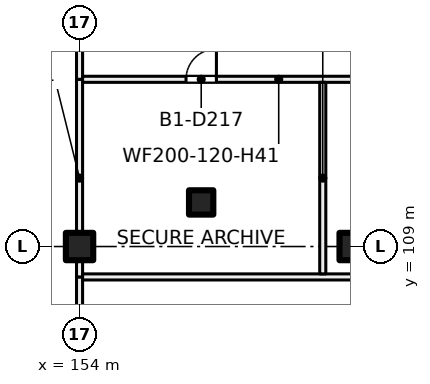
"""IFC4 building model, lengths in metres.
Left out: names, types, materials, properties, quantities, classifications, styles, units other than length and angle.
Written with IfcOpenShell. Run it as: python <this file> out.ifc"""

import sys

from ifc_helpers import new_model, si_unit, direction, frame, frame_2d, origin, origin_2d, place, context, subcontext, project, spatial, rectangle, extrude, element, fill, save


model = new_model("IFC4")
c1 = context("Model", 3, precision=1e-05, world=origin(), true_north=direction((0.0, 1.0)))
c2 = subcontext(c1, "Body", "Model", "MODEL_VIEW")
j1 = project(units=[si_unit("LENGTHUNIT", "METRE"), si_unit("PLANEANGLEUNIT", "RADIAN")], contexts=[c1])
p1 = place(None, origin())
s1 = spatial("IfcSite", under=j1, at=p1, CompositionType="ELEMENT")
p2 = place(p1, origin())
s2 = spatial("IfcBuilding", under=s1, at=p2, CompositionType="ELEMENT")
p3 = place(p2, frame((0.0, 0.0, -4.5)))
s3 = spatial("IfcBuildingStorey", under=s2, at=p3, CompositionType="ELEMENT", Elevation=-4.5)
for number, where, z_axis, x_axis in (
    (1, (154.0, 109.0, 0.0), (0.0, 0.0, 1.0), (1.0, 0.0, 0.0)),
    (2, (163.0, 109.0, 0.0), (0.0, 0.0, 1.0), (1.0, 0.0, 0.0)),
):
    element("IfcColumn", number, at=place(p3, frame(where, z_axis=z_axis, x_axis=x_axis)), inside=s3, PredefinedType="COLUMN", context=c2, shape_type="SweptSolid", body=[
        extrude(rectangle(XDim=0.9, YDim=0.9, at=origin_2d()), origin(), (0.0, 0.0, 1.0), 4.5),
    ])
p4 = place(p3, frame((158.0, 110.45, 0.0), z_axis=(0.0, 0.0, 1.0), x_axis=(1.0, 0.0, 0.0)))
e3 = element("IfcColumn", 3, at=p4, inside=s3, PredefinedType="COLUMN", context=c2, shape_type="SweptSolid", body=[
    extrude(rectangle(XDim=0.8, YDim=0.8, at=origin_2d()), origin(), (0.0, 0.0, 1.0), 4.5),
])
p5 = place(p3, frame((154.0, 104.1, 0.0), z_axis=(0.0, 0.0, 1.0), x_axis=(0.0, 1.0, 0.0)))
e4 = element("IfcWall", 4, at=p5, inside=s3, PredefinedType="PARTITIONING", context=c2, shape_type="SweptSolid", body=[
    extrude(rectangle(XDim=3.9, YDim=0.2, at=frame_2d((1.95, 0.0))), origin(), (0.0, 0.0, 1.0), 4.1),
])
p6 = place(p3, frame((154.0, 108.0, 0.0), z_axis=(0.0, 0.0, 1.0), x_axis=(0.0, 1.0, 0.0)))
e5 = element("IfcWall", 5, at=p6, inside=s3, PredefinedType="PARTITIONING", context=c2, shape_type="SweptSolid", body=[
    extrude(rectangle(XDim=6.5, YDim=0.2, at=frame_2d((3.25, 0.0))), origin(), (0.0, 0.0, 1.0), 4.1),
])
p7 = place(p3, frame((154.1, 108.0, 0.0), z_axis=(0.0, 0.0, 1.0), x_axis=(1.0, 0.0, 0.0)))
e6 = element("IfcWall", 6, at=p7, inside=s3, PredefinedType="PARTITIONING", context=c2, shape_type="SweptSolid", body=[
    extrude(rectangle(XDim=18.469, YDim=0.2, at=frame_2d((9.234, 0.0))), origin(), (0.0, 0.0, 1.0), 4.1),
])
p8 = place(p3, frame((154.0, 114.5, 0.0), z_axis=(0.0, 0.0, 1.0), x_axis=(0.0, 1.0, 0.0)))
e7 = element("IfcWall", 7, at=p8, inside=s3, PredefinedType="PARTITIONING", context=c2, shape_type="SweptSolid", body=[
    extrude(rectangle(XDim=2.5, YDim=0.2, at=frame_2d((1.25, 0.0))), origin(), (0.0, 0.0, 1.0), 4.1),
])
p9 = place(p3, frame((167.002, 114.5, 0.0), z_axis=(0.0, 0.0, 1.0), x_axis=(-1.0, 0.0, 0.0)))
e8 = element("IfcWall", 8, at=p9, inside=s3, PredefinedType="PARTITIONING", context=c2, shape_type="SweptSolid", body=[
    extrude(rectangle(XDim=12.902, YDim=0.2, at=frame_2d((6.451, 0.0))), origin(), (0.0, 0.0, 1.0), 4.1),
])
p10 = place(p9, frame((8.5, 0.0, 0.0)))
e9 = element("IfcOpeningElement", 9, at=p10, cuts=e8, PredefinedType="OPENING", context=c2, shape_type="SweptSolid", body=[
    extrude(rectangle(XDim=1.0, YDim=2.1, at=frame_2d((0.5, 1.05))), frame((0.0, 0.11, 0.0), z_axis=(0.0, -1.0, 0.0), x_axis=(1.0, 0.0, 0.0)), (0.0, 0.0, 1.0), 0.22),
])
p11 = place(p3, frame((162.0, 108.1, 0.0), z_axis=(0.0, 0.0, 1.0), x_axis=(0.0, 1.0, 0.0)))
e10 = element("IfcWall", 10, at=p11, inside=s3, PredefinedType="PARTITIONING", context=c2, shape_type="SweptSolid", body=[
    extrude(rectangle(XDim=6.3, YDim=0.2, at=frame_2d((3.15, 0.0))), origin(), (0.0, 0.0, 1.0), 4.1),
])
p12 = place(p10, origin())
e11 = element("IfcDoor", 11, at=p12, inside=s3, OperationType="SINGLE_SWING_LEFT", PredefinedType="DOOR", context=c2, shape_type="SweptSolid", body=[
    extrude(rectangle(XDim=1.0, YDim=2.1, at=frame_2d((0.5, 1.05))), frame((0.0, 0.025, 0.0), z_axis=(0.0, -1.0, 0.0), x_axis=(1.0, 0.0, 0.0)), (0.0, 0.0, 1.0), 0.05),
])
fill(e9, e11)
save(model, sys.argv[1])
